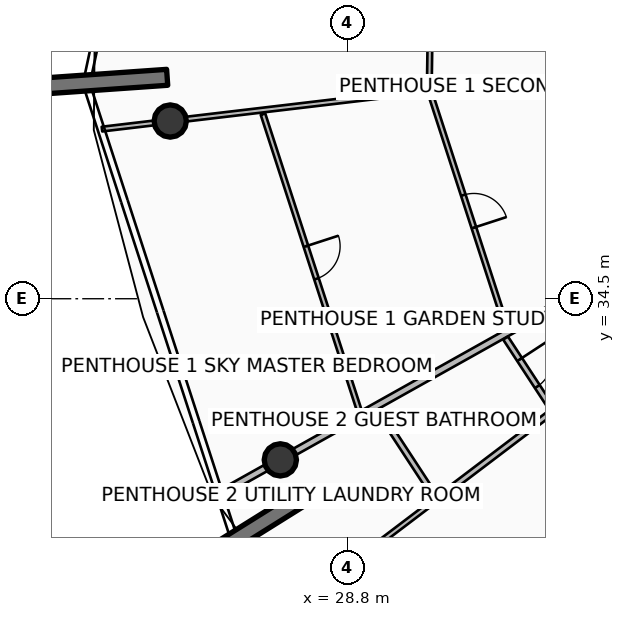
"""IFC4 building model, lengths in metres.
Left out: names, types, materials, properties, quantities, classifications, styles, units other than length and angle.
Written with IfcOpenShell. Run it as: python <this file> out.ifc"""

import sys

from ifc_helpers import new_model, si_unit, direction, frame, frame_2d, origin, origin_2d, place, context, subcontext, project, spatial, rectangle, circle, extrude, element, fill, save


model = new_model("IFC4")
c1 = context("Model", 3, precision=1e-05, world=origin(), true_north=direction((0.0, 1.0)))
c2 = subcontext(c1, "Body", "Model", "MODEL_VIEW")
j1 = project(units=[si_unit("LENGTHUNIT", "METRE"), si_unit("PLANEANGLEUNIT", "RADIAN")], contexts=[c1])
p1 = place(None, origin())
s1 = spatial("IfcSite", under=j1, at=p1, CompositionType="ELEMENT")
p2 = place(p1, origin())
s2 = spatial("IfcBuilding", under=s1, at=p2, CompositionType="ELEMENT")
p3 = place(p2, frame((0.0, 0.0, 317.9)))
s3 = spatial("IfcBuildingStorey", under=s2, at=p3, CompositionType="ELEMENT", Elevation=317.9)
for number, where, z_axis, x_axis in (
    (1, (24.059, 40.326, 0.0), (0.0, 0.0, 1.0), (-0.998, -0.07, 0.0)),
    (2, (27.647, 29.282, 0.0), (0.0, 0.0, 1.0), (-0.848, -0.53, 0.0)),
):
    element("IfcWall", number, at=place(p3, frame(where, z_axis=z_axis, x_axis=x_axis)), inside=s3, PredefinedType="SOLIDWALL", context=c2, shape_type="SweptSolid", body=[
        extrude(rectangle(XDim=3.5, YDim=0.42, at=frame_2d((1.75, 0.0))), origin(), (0.0, 0.0, 1.0), 4.2),
    ])
for number, where, z_axis, x_axis in (
    (3, (24.14, 39.176, 0.0), (0.0, 0.0, 1.0), (1.0, 0.0, 0.0)),
    (4, (27.037, 30.26, 0.0), (0.0, 0.0, 1.0), (1.0, 0.0, 0.0)),
):
    element("IfcColumn", number, at=place(p3, frame(where, z_axis=z_axis, x_axis=x_axis)), inside=s3, PredefinedType="COLUMN", context=c2, shape_type="SweptSolid", body=[
        extrude(circle(Radius=0.425, at=origin_2d()), origin(), (0.0, 0.0, 1.0), 3.94),
    ])
p4 = place(p3, frame((37.204, 35.954, 0.0), z_axis=(0.0, 0.0, 1.0), x_axis=(-0.872495191914, -0.488622697064, 0.0)))
e5 = element("IfcWall", 5, at=p4, inside=s3, PredefinedType="PARTITIONING", context=c2, shape_type="SweptSolid", body=[
    extrude(rectangle(XDim=13.462, YDim=0.18, at=frame_2d((6.731, 0.0))), origin(), (0.0, 0.0, 1.0), 3.38),
])
p5 = place(p3, frame((31.019, 44.418, 0.0), z_axis=(0.0, 0.0, 1.0), x_axis=(-0.014133062898, -0.999900123279, 0.0)))
e6 = element("IfcWall", 6, at=p5, inside=s3, PredefinedType="PARTITIONING", context=c2, shape_type="SweptSolid", body=[
    extrude(rectangle(XDim=4.336, YDim=0.125, at=frame_2d((2.168, 0.0))), origin(), (0.0, 0.0, 1.0), 3.38),
])
p6 = place(p5, frame((1.718, 0.0, 0.0)))
e7 = element("IfcOpeningElement", 7, at=p6, cuts=e6, PredefinedType="OPENING", context=c2, shape_type="SweptSolid", body=[
    extrude(rectangle(XDim=0.9, YDim=2.08, at=frame_2d((0.45, 1.04))), frame((0.0, 0.073, 0.0), z_axis=(0.0, -1.0, 0.0), x_axis=(1.0, 0.0, 0.0)), (0.0, 0.0, 1.0), 0.145),
])
p7 = place(p3, frame((30.857, 39.971, 0.0), z_axis=(0.0, 0.0, 1.0), x_axis=(-0.993069304007, -0.117530240533, 0.0)))
e8 = element("IfcWall", 8, at=p7, inside=s3, PredefinedType="PARTITIONING", context=c2, shape_type="SweptSolid", body=[
    extrude(rectangle(XDim=8.573, YDim=0.125, at=frame_2d((4.286, 0.0))), origin(), (0.0, 0.0, 1.0), 3.38),
])
p8 = place(p3, frame((30.99, 39.878, 0.0), z_axis=(0.0, 0.0, 1.0), x_axis=(0.309026406972, -0.951053457905, 0.0)))
e9 = element("IfcWall", 9, at=p8, inside=s3, PredefinedType="PARTITIONING", context=c2, shape_type="SweptSolid", body=[
    extrude(rectangle(XDim=6.477, YDim=0.125, at=frame_2d((3.238, 0.0))), origin(), (0.0, 0.0, 1.0), 3.38),
])
p9 = place(p8, frame((2.788, 0.0, 0.0)))
e10 = element("IfcOpeningElement", 10, at=p9, cuts=e9, PredefinedType="OPENING", context=c2, shape_type="SweptSolid", body=[
    extrude(rectangle(XDim=0.9, YDim=2.08, at=frame_2d((0.45, 1.04))), frame((0.0, 0.073, 0.0), z_axis=(0.0, -1.0, 0.0), x_axis=(1.0, 0.0, 0.0)), (0.0, 0.0, 1.0), 0.145),
])
p10 = place(p3, frame((26.581, 39.356, 0.0), z_axis=(0.0, 0.0, 1.0), x_axis=(0.309000666789, -0.951061821294, 0.0)))
e11 = element("IfcWall", 11, at=p10, inside=s3, PredefinedType="PARTITIONING", context=c2, shape_type="SweptSolid", body=[
    extrude(rectangle(XDim=8.209, YDim=0.125, at=frame_2d((4.104, 0.0))), origin(), (0.0, 0.0, 1.0), 3.38),
])
p11 = place(p10, frame((3.655, 0.0, 0.0)))
e12 = element("IfcOpeningElement", 12, at=p11, cuts=e11, PredefinedType="OPENING", context=c2, shape_type="SweptSolid", body=[
    extrude(rectangle(XDim=0.9, YDim=2.08, at=frame_2d((0.45, 1.04))), frame((0.0, 0.073, 0.0), z_axis=(0.0, -1.0, 0.0), x_axis=(1.0, 0.0, 0.0)), (0.0, 0.0, 1.0), 0.145),
])
p12 = place(p3, frame((32.964, 33.465, 0.0), z_axis=(0.0, 0.0, 1.0), x_axis=(0.547736904717, -0.836650633903, 0.0)))
e13 = element("IfcWall", 13, at=p12, inside=s3, PredefinedType="PARTITIONING", context=c2, shape_type="SweptSolid", body=[
    extrude(rectangle(XDim=2.199, YDim=0.15, at=frame_2d((1.099, 0.0))), origin(), (0.0, 0.0, 1.0), 3.38),
])
p13 = place(p12, frame((0.674, 0.0, 0.0)))
e14 = element("IfcOpeningElement", 14, at=p13, cuts=e13, PredefinedType="OPENING", context=c2, shape_type="SweptSolid", body=[
    extrude(rectangle(XDim=0.85, YDim=2.06, at=frame_2d((0.425, 1.03))), frame((0.0, 0.085, 0.0), z_axis=(0.0, -1.0, 0.0), x_axis=(1.0, 0.0, 0.0)), (0.0, 0.0, 1.0), 0.17),
])
p14 = place(p3, frame((29.605, 31.584, 0.0), z_axis=(0.0, 0.0, 1.0), x_axis=(0.547706970619, -0.836670230339, 0.0)))
e15 = element("IfcWall", 15, at=p14, inside=s3, PredefinedType="PARTITIONING", context=c2, shape_type="SweptSolid", body=[
    extrude(rectangle(XDim=2.731, YDim=0.15, at=frame_2d((1.365, 0.0))), origin(), (0.0, 0.0, 1.0), 3.38),
])
p15 = place(p3, frame((34.146, 31.496, 0.0), z_axis=(0.0, 0.0, 1.0), x_axis=(-0.796862333182, -0.60416092389, 0.0)))
e16 = element("IfcWall", 16, at=p15, inside=s3, PredefinedType="PARTITIONING", context=c2, shape_type="SweptSolid", body=[
    extrude(rectangle(XDim=3.72, YDim=0.15, at=frame_2d((1.86, 0.0))), origin(), (0.0, 0.0, 1.0), 3.38),
])
p16 = place(p3, frame((31.078, 29.17, 0.0), z_axis=(0.0, 0.0, 1.0), x_axis=(-0.796851341582, -0.604175421064, 0.0)))
e17 = element("IfcWall", 17, at=p16, inside=s3, PredefinedType="PARTITIONING", context=c2, shape_type="SweptSolid", body=[
    extrude(rectangle(XDim=4.304, YDim=0.125, at=frame_2d((2.152, 0.0))), origin(), (0.0, 0.0, 1.0), 3.38),
])
p17 = place(p16, frame((1.727, 0.0, 0.0)))
e18 = element("IfcOpeningElement", 18, at=p17, cuts=e17, PredefinedType="OPENING", context=c2, shape_type="SweptSolid", body=[
    extrude(rectangle(XDim=0.85, YDim=2.06, at=frame_2d((0.425, 1.03))), frame((0.0, 0.073, 0.0), z_axis=(0.0, -1.0, 0.0), x_axis=(1.0, 0.0, 0.0)), (0.0, 0.0, 1.0), 0.145),
])
p18 = place(p3, frame((35.7, 29.713, 0.0), z_axis=(0.0, 0.0, 1.0), x_axis=(-0.707470011435, -0.706743364256, 0.0)))
e19 = element("IfcWall", 19, at=p18, inside=s3, PredefinedType="PARTITIONING", context=c2, shape_type="SweptSolid", body=[
    extrude(rectangle(XDim=7.728, YDim=0.125, at=frame_2d((3.864, 0.0))), origin(), (0.0, 0.0, 1.0), 3.38),
])
p19 = place(p3, frame((37.23, 28.339, 0.0), z_axis=(0.0, 0.0, 1.0), x_axis=(-0.619087123863, -0.785322311581, 0.0)))
e20 = element("IfcWall", 20, at=p19, inside=s3, PredefinedType="PARTITIONING", context=c2, shape_type="SweptSolid", body=[
    extrude(rectangle(XDim=7.731, YDim=0.125, at=frame_2d((3.865, 0.0))), origin(), (0.0, 0.0, 1.0), 3.38),
])
p20 = place(p9, origin())
e21 = element("IfcDoor", 21, at=p20, inside=s3, OperationType="SINGLE_SWING_RIGHT", PredefinedType="DOOR", context=c2, shape_type="SweptSolid", body=[
    extrude(rectangle(XDim=0.9, YDim=2.08, at=frame_2d((0.45, 1.04))), frame((0.0, 0.025, 0.0), z_axis=(0.0, -1.0, 0.0), x_axis=(1.0, 0.0, 0.0)), (0.0, 0.0, 1.0), 0.05),
])
fill(e10, e21)
p21 = place(p11, origin())
e22 = element("IfcDoor", 22, at=p21, inside=s3, OperationType="SINGLE_SWING_LEFT", PredefinedType="DOOR", context=c2, shape_type="SweptSolid", body=[
    extrude(rectangle(XDim=0.9, YDim=2.08, at=frame_2d((0.45, 1.04))), frame((0.0, 0.025, 0.0), z_axis=(0.0, -1.0, 0.0), x_axis=(1.0, 0.0, 0.0)), (0.0, 0.0, 1.0), 0.05),
])
fill(e12, e22)
p22 = place(p13, origin())
e23 = element("IfcDoor", 23, at=p22, inside=s3, OperationType="SINGLE_SWING_LEFT", PredefinedType="DOOR", context=c2, shape_type="SweptSolid", body=[
    extrude(rectangle(XDim=0.85, YDim=2.06, at=frame_2d((0.425, 1.03))), frame((0.0, 0.025, 0.0), z_axis=(0.0, -1.0, 0.0), x_axis=(1.0, 0.0, 0.0)), (0.0, 0.0, 1.0), 0.05),
])
fill(e14, e23)
save(model, sys.argv[1])
